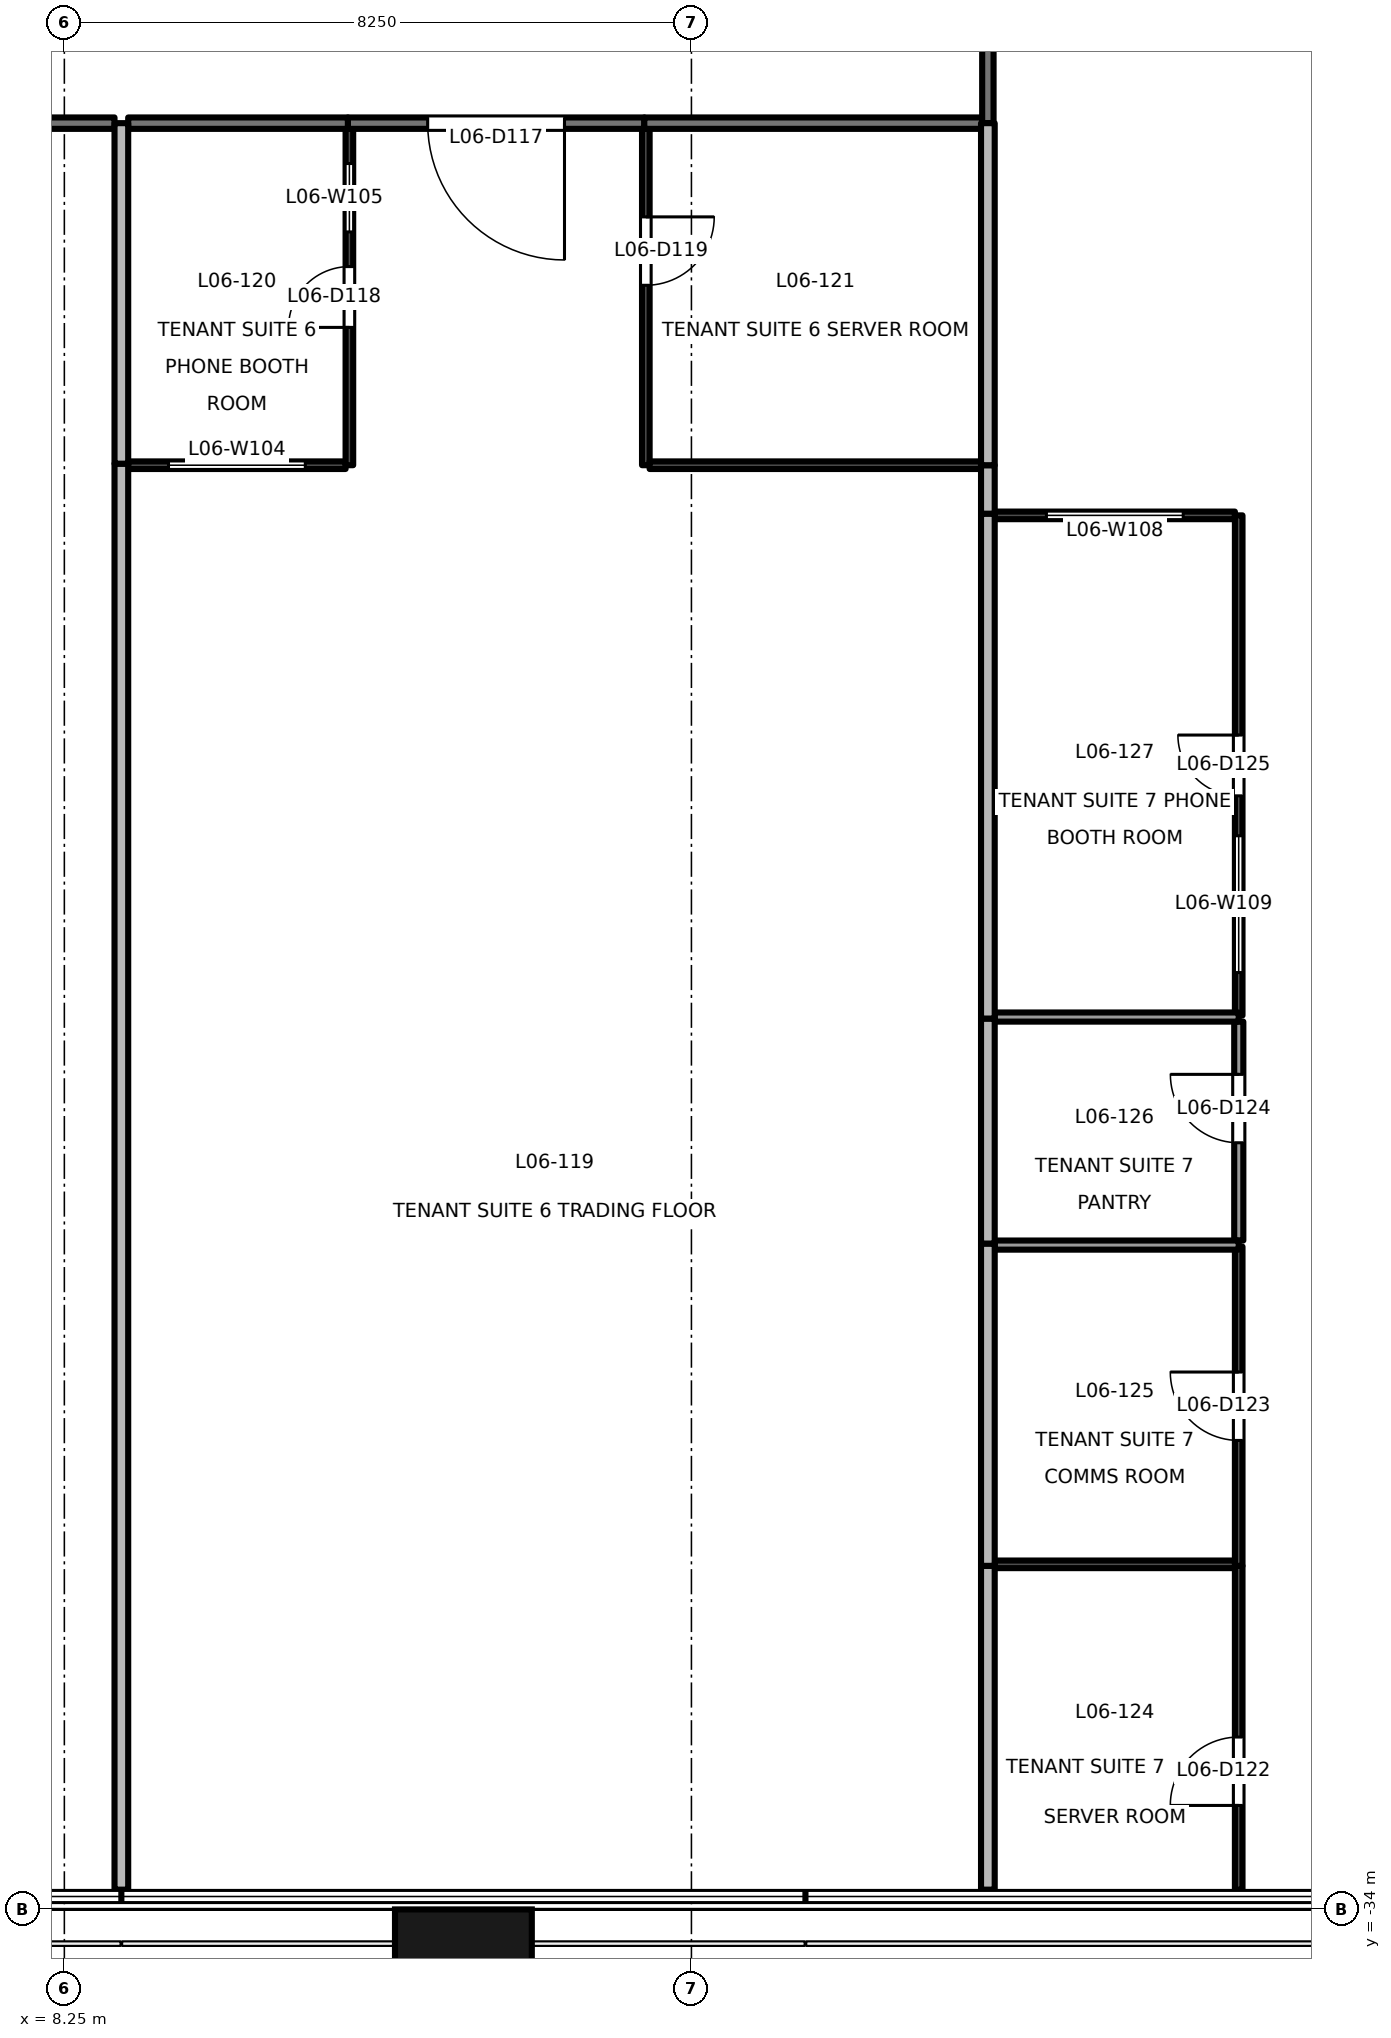
"""IFC4 building model, lengths in metres.
Left out: names, types, materials, properties, quantities, classifications, styles, units other than length and angle.
Written with IfcOpenShell. Run it as: python <this file> out.ifc"""

import sys

from ifc_helpers import new_model, si_unit, direction, frame, frame_2d, origin, origin_2d, place, context, subcontext, project, spatial, rectangle, extrude, element, fill, save


model = new_model("IFC4")
c1 = context("Model", 3, precision=1e-05, world=origin(), true_north=direction((0.0, 1.0)))
c2 = subcontext(c1, "Body", "Model", "MODEL_VIEW")
j1 = project(units=[si_unit("LENGTHUNIT", "METRE"), si_unit("PLANEANGLEUNIT", "RADIAN")], contexts=[c1])
p1 = place(None, origin())
s1 = spatial("IfcSite", under=j1, at=p1, CompositionType="ELEMENT")
p2 = place(p1, origin())
s2 = spatial("IfcBuilding", under=s1, at=p2, CompositionType="ELEMENT")
p3 = place(p2, frame((0.0, 0.0, 32.4)))
s3 = spatial("IfcBuildingStorey", under=s2, at=p3, CompositionType="ELEMENT", Elevation=32.4)
p4 = place(p3, frame((13.5, -34.9, -0.2), z_axis=(0.0, 0.0, 1.0), x_axis=(1.0, 0.0, 0.0)))
e1 = element("IfcColumn", 1, at=p4, inside=s3, PredefinedType="COLUMN", context=c2, shape_type="SweptSolid", body=[
    extrude(rectangle(XDim=1.8, YDim=1.8, at=origin_2d()), origin(), (0.0, 0.0, 1.0), 4.1),
])
p5 = place(p3, frame((8.91, -10.5, 0.0), z_axis=(0.0, 0.0, 1.0), x_axis=(-1.0, 0.0, 0.0)))
e2 = element("IfcWall", 2, at=p5, inside=s3, PredefinedType="PARTITIONING", context=c2, shape_type="SweptSolid", body=[
    extrude(rectangle(XDim=5.93, YDim=0.15, at=frame_2d((2.965, 0.0))), origin(), (0.0, 0.0, 1.0), 2.9),
])
p6 = place(p5, frame((3.197, 0.0, 0.0)))
e3 = element("IfcOpeningElement", 3, at=p6, cuts=e2, PredefinedType="OPENING", context=c2, shape_type="SweptSolid", body=[
    extrude(rectangle(XDim=1.5, YDim=2.1, at=frame_2d((0.75, 1.05))), frame((0.0, 0.085, 0.0), z_axis=(0.0, -1.0, 0.0), x_axis=(1.0, 0.0, 0.0)), (0.0, 0.0, 1.0), 0.171),
])
p7 = place(p3, frame((15.88, -10.5, 0.0), z_axis=(0.0, 0.0, 1.0), x_axis=(-1.0, 0.0, 0.0)))
e4 = element("IfcWall", 4, at=p7, inside=s3, PredefinedType="PARTITIONING", context=c2, shape_type="SweptSolid", body=[
    extrude(rectangle(XDim=3.9, YDim=0.15, at=frame_2d((1.95, 0.0))), origin(), (0.0, 0.0, 1.0), 2.9),
])
p8 = place(p7, frame((1.05, 0.0, 0.0)))
e5 = element("IfcOpeningElement", 5, at=p8, cuts=e4, PredefinedType="OPENING", context=c2, shape_type="SweptSolid", body=[
    extrude(rectangle(XDim=1.8, YDim=2.1, at=frame_2d((0.9, 1.05))), frame((0.0, 0.085, 0.0), z_axis=(0.0, -1.0, 0.0), x_axis=(1.0, 0.0, 0.0)), (0.0, 0.0, 1.0), 0.171),
])
p9 = place(p3, frame((11.98, -10.5, 0.0), z_axis=(0.0, 0.0, 1.0), x_axis=(-1.0, 0.0, 0.0)))
e6 = element("IfcWall", 6, at=p9, inside=s3, PredefinedType="PARTITIONING", context=c2, shape_type="SweptSolid", body=[
    extrude(rectangle(XDim=2.89, YDim=0.15, at=frame_2d((1.445, 0.0))), origin(), (0.0, 0.0, 1.0), 2.9),
])
p10 = place(p3, frame((20.325, -10.5, 0.0), z_axis=(0.0, 0.0, 1.0), x_axis=(-1.0, 0.0, 0.0)))
e7 = element("IfcWall", 7, at=p10, inside=s3, PredefinedType="PARTITIONING", context=c2, shape_type="SweptSolid", body=[
    extrude(rectangle(XDim=4.445, YDim=0.15, at=frame_2d((2.223, 0.0))), origin(), (0.0, 0.0, 1.0), 2.5),
])
p11 = place(p3, frame((20.4, -4.817, 0.0), z_axis=(0.0, 0.0, 1.0), x_axis=(0.0, -1.0, 0.0)))
e8 = element("IfcWall", 8, at=p11, inside=s3, PredefinedType="PARTITIONING", context=c2, shape_type="SweptSolid", body=[
    extrude(rectangle(XDim=5.683, YDim=0.15, at=frame_2d((2.842, 0.0))), origin(), (0.0, 0.0, 1.0), 3.3),
])
p12 = place(p11, frame((1.942, 0.0, 0.0)))
e9 = element("IfcOpeningElement", 9, at=p12, cuts=e8, PredefinedType="OPENING", context=c2, shape_type="SweptSolid", body=[
    extrude(rectangle(XDim=1.8, YDim=2.1, at=frame_2d((0.9, 1.05))), frame((0.0, 0.085, 0.0), z_axis=(0.0, -1.0, 0.0), x_axis=(1.0, 0.0, 0.0)), (0.0, 0.0, 1.0), 0.171),
])
p13 = place(p3, frame((9.0, -14.98, 0.0), z_axis=(0.0, 0.0, 1.0), x_axis=(0.0, -1.0, 0.0)))
e10 = element("IfcWall", 10, at=p13, inside=s3, PredefinedType="PARTITIONING", context=c2, shape_type="SweptSolid", body=[
    extrude(rectangle(XDim=18.76, YDim=0.18, at=frame_2d((9.38, 0.0))), origin(), (0.0, 0.0, 1.0), 2.9),
])
p14 = place(p3, frame((9.0, -10.5, 0.0), z_axis=(0.0, 0.0, 1.0), x_axis=(0.0, -1.0, 0.0)))
e11 = element("IfcWall", 11, at=p14, inside=s3, PredefinedType="PARTITIONING", context=c2, shape_type="SweptSolid", body=[
    extrude(rectangle(XDim=4.48, YDim=0.18, at=frame_2d((2.24, 0.0))), origin(), (0.0, 0.0, 1.0), 2.9),
])
p15 = place(p3, frame((9.09, -15.0, 0.0), z_axis=(0.0, 0.0, 1.0), x_axis=(1.0, 0.0, 0.0)))
e12 = element("IfcWall", 12, at=p15, inside=s3, PredefinedType="PARTITIONING", context=c2, shape_type="SweptSolid", body=[
    extrude(rectangle(XDim=2.86, YDim=0.1, at=frame_2d((1.43, 0.0))), origin(), (0.0, 0.0, 1.0), 2.9),
])
p16 = place(p15, frame((0.53, 0.0, 0.9)))
e13 = element("IfcOpeningElement", 13, at=p16, cuts=e12, PredefinedType="OPENING", context=c2, shape_type="SweptSolid", body=[
    extrude(rectangle(XDim=1.8, YDim=1.2, at=frame_2d((0.9, 0.6))), frame((0.0, 0.061, 0.0), z_axis=(0.0, -1.0, 0.0), x_axis=(1.0, 0.0, 0.0)), (0.0, 0.0, 1.0), 0.121),
])
p17 = place(p3, frame((12.0, -15.0, 0.0), z_axis=(0.0, 0.0, 1.0), x_axis=(0.0, 1.0, 0.0)))
e14 = element("IfcWall", 14, at=p17, inside=s3, PredefinedType="PARTITIONING", context=c2, shape_type="SweptSolid", body=[
    extrude(rectangle(XDim=4.425, YDim=0.1, at=frame_2d((2.212, 0.0))), origin(), (0.0, 0.0, 1.0), 3.9),
])
p18 = place(p17, frame((1.813, 0.0, 0.0)))
e15 = element("IfcOpeningElement", 15, at=p18, cuts=e14, PredefinedType="OPENING", context=c2, shape_type="SweptSolid", body=[
    extrude(rectangle(XDim=0.8, YDim=2.1, at=frame_2d((0.4, 1.05))), frame((0.0, 0.061, 0.0), z_axis=(0.0, -1.0, 0.0), x_axis=(1.0, 0.0, 0.0)), (0.0, 0.0, 1.0), 0.121),
])
p19 = place(p17, frame((3.069, 0.0, 0.9)))
e16 = element("IfcOpeningElement", 16, at=p19, cuts=e14, PredefinedType="OPENING", context=c2, shape_type="SweptSolid", body=[
    extrude(rectangle(XDim=0.9, YDim=1.2, at=frame_2d((0.45, 0.6))), frame((0.0, 0.061, 0.0), z_axis=(0.0, -1.0, 0.0), x_axis=(1.0, 0.0, 0.0)), (0.0, 0.0, 1.0), 0.121),
])
p20 = place(p3, frame((15.9, -10.575, 0.0), z_axis=(0.0, 0.0, 1.0), x_axis=(0.0, -1.0, 0.0)))
e17 = element("IfcWall", 17, at=p20, inside=s3, PredefinedType="PARTITIONING", context=c2, shape_type="SweptSolid", body=[
    extrude(rectangle(XDim=4.425, YDim=0.1, at=frame_2d((2.212, 0.0))), origin(), (0.0, 0.0, 1.0), 3.9),
])
p21 = place(p20, frame((1.158, 0.0, 0.0)))
e18 = element("IfcOpeningElement", 18, at=p21, cuts=e17, PredefinedType="OPENING", context=c2, shape_type="SweptSolid", body=[
    extrude(rectangle(XDim=0.9, YDim=2.1, at=frame_2d((0.45, 1.05))), frame((0.0, 0.061, 0.0), z_axis=(0.0, -1.0, 0.0), x_axis=(1.0, 0.0, 0.0)), (0.0, 0.0, 1.0), 0.121),
])
p22 = place(p3, frame((15.95, -15.0, 0.0), z_axis=(0.0, 0.0, 1.0), x_axis=(1.0, 0.0, 0.0)))
e19 = element("IfcWall", 19, at=p22, inside=s3, PredefinedType="PARTITIONING", context=c2, shape_type="SweptSolid", body=[
    extrude(rectangle(XDim=4.36, YDim=0.1, at=frame_2d((2.18, 0.0))), origin(), (0.0, 0.0, 1.0), 2.5),
])
p23 = place(p3, frame((20.4, -15.0, 0.0), z_axis=(0.0, 0.0, 1.0), x_axis=(0.0, -1.0, 0.0)))
e20 = element("IfcWall", 20, at=p23, inside=s3, PredefinedType="PARTITIONING", context=c2, shape_type="SweptSolid", body=[
    extrude(rectangle(XDim=0.64, YDim=0.18, at=frame_2d((0.32, 0.0))), origin(), (0.0, 0.0, 1.0), 3.9),
])
p24 = place(p3, frame((20.4, -29.48, 0.0), z_axis=(0.0, 0.0, 1.0), x_axis=(0.0, -1.0, 0.0)))
e21 = element("IfcWall", 21, at=p24, inside=s3, PredefinedType="PARTITIONING", context=c2, shape_type="SweptSolid", body=[
    extrude(rectangle(XDim=4.26, YDim=0.18, at=frame_2d((2.13, 0.0))), origin(), (0.0, 0.0, 1.0), 3.9),
])
p25 = place(p3, frame((20.4, -25.24, 0.0), z_axis=(0.0, 0.0, 1.0), x_axis=(0.0, -1.0, 0.0)))
e22 = element("IfcWall", 22, at=p25, inside=s3, PredefinedType="PARTITIONING", context=c2, shape_type="SweptSolid", body=[
    extrude(rectangle(XDim=4.24, YDim=0.18, at=frame_2d((2.12, 0.0))), origin(), (0.0, 0.0, 1.0), 3.3),
])
p26 = place(p3, frame((20.4, -22.28, 0.0), z_axis=(0.0, 0.0, 1.0), x_axis=(0.0, -1.0, 0.0)))
e23 = element("IfcWall", 23, at=p26, inside=s3, PredefinedType="PARTITIONING", context=c2, shape_type="SweptSolid", body=[
    extrude(rectangle(XDim=2.96, YDim=0.18, at=frame_2d((1.48, 0.0))), origin(), (0.0, 0.0, 1.0), 3.3),
])
p27 = place(p3, frame((20.4, -15.64, 0.0), z_axis=(0.0, 0.0, 1.0), x_axis=(0.0, -1.0, 0.0)))
e24 = element("IfcWall", 24, at=p27, inside=s3, PredefinedType="PARTITIONING", context=c2, shape_type="SweptSolid", body=[
    extrude(rectangle(XDim=6.64, YDim=0.18, at=frame_2d((3.32, 0.0))), origin(), (0.0, 0.0, 1.0), 3.3),
])
p28 = place(p3, frame((20.4, -10.5, 0.0), z_axis=(0.0, 0.0, 1.0), x_axis=(0.0, -1.0, 0.0)))
e25 = element("IfcWall", 25, at=p28, inside=s3, PredefinedType="PARTITIONING", context=c2, shape_type="SweptSolid", body=[
    extrude(rectangle(XDim=4.5, YDim=0.18, at=frame_2d((2.25, 0.0))), origin(), (0.0, 0.0, 1.0), 3.3),
])
p29 = place(p3, frame((23.7, -33.74, 0.0), z_axis=(0.0, 0.0, 1.0), x_axis=(0.0, 1.0, 0.0)))
e26 = element("IfcWall", 26, at=p29, inside=s3, PredefinedType="PARTITIONING", context=c2, shape_type="SweptSolid", body=[
    extrude(rectangle(XDim=4.26, YDim=0.1, at=frame_2d((2.13, 0.0))), origin(), (0.0, 0.0, 1.0), 3.9),
])
p30 = place(p29, frame((1.108, 0.0, 0.0)))
e27 = element("IfcOpeningElement", 27, at=p30, cuts=e26, PredefinedType="OPENING", context=c2, shape_type="SweptSolid", body=[
    extrude(rectangle(XDim=0.9, YDim=2.1, at=frame_2d((0.45, 1.05))), frame((0.0, 0.061, 0.0), z_axis=(0.0, -1.0, 0.0), x_axis=(1.0, 0.0, 0.0)), (0.0, 0.0, 1.0), 0.121),
])
p31 = place(p3, frame((23.7, -29.48, 0.0), z_axis=(0.0, 0.0, 1.0), x_axis=(0.0, 1.0, 0.0)))
e28 = element("IfcWall", 28, at=p31, inside=s3, PredefinedType="PARTITIONING", context=c2, shape_type="SweptSolid", body=[
    extrude(rectangle(XDim=4.2, YDim=0.1, at=frame_2d((2.1, 0.0))), origin(), (0.0, 0.0, 1.0), 3.3),
])
p32 = place(p31, frame((1.65, 0.0, 0.0)))
e29 = element("IfcOpeningElement", 29, at=p32, cuts=e28, PredefinedType="OPENING", context=c2, shape_type="SweptSolid", body=[
    extrude(rectangle(XDim=0.9, YDim=2.1, at=frame_2d((0.45, 1.05))), frame((0.0, 0.061, 0.0), z_axis=(0.0, -1.0, 0.0), x_axis=(1.0, 0.0, 0.0)), (0.0, 0.0, 1.0), 0.121),
])
p33 = place(p3, frame((23.701, -25.2, 0.0), z_axis=(0.0, 0.0, 1.0), x_axis=(0.0, 1.0, 0.0)))
e30 = element("IfcWall", 30, at=p33, inside=s3, PredefinedType="PARTITIONING", context=c2, shape_type="SweptSolid", body=[
    extrude(rectangle(XDim=2.88, YDim=0.12, at=frame_2d((1.44, 0.0))), origin(), (0.0, 0.0, 1.0), 3.3),
])
p34 = place(p33, frame((1.286, 0.0, 0.0)))
e31 = element("IfcOpeningElement", 31, at=p34, cuts=e30, PredefinedType="OPENING", context=c2, shape_type="SweptSolid", body=[
    extrude(rectangle(XDim=0.9, YDim=2.1, at=frame_2d((0.45, 1.05))), frame((0.0, 0.071, 0.0), z_axis=(0.0, -1.0, 0.0), x_axis=(1.0, 0.0, 0.0)), (0.0, 0.0, 1.0), 0.141),
])
p35 = place(p3, frame((23.65, -15.66, 0.0), z_axis=(0.0, 0.0, 1.0), x_axis=(-1.0, 0.0, 0.0)))
e32 = element("IfcWall", 32, at=p35, inside=s3, PredefinedType="PARTITIONING", context=c2, shape_type="SweptSolid", body=[
    extrude(rectangle(XDim=3.16, YDim=0.1, at=frame_2d((1.58, 0.0))), origin(), (0.0, 0.0, 1.0), 3.9),
])
p36 = place(p35, frame((0.68, 0.0, 0.9)))
e33 = element("IfcOpeningElement", 33, at=p36, cuts=e32, PredefinedType="OPENING", context=c2, shape_type="SweptSolid", body=[
    extrude(rectangle(XDim=1.8, YDim=1.2, at=frame_2d((0.9, 0.6))), frame((0.0, 0.061, 0.0), z_axis=(0.0, -1.0, 0.0), x_axis=(1.0, 0.0, 0.0)), (0.0, 0.0, 1.0), 0.121),
])
p37 = place(p3, frame((23.7, -22.24, 0.0), z_axis=(0.0, 0.0, 1.0), x_axis=(0.0, 1.0, 0.0)))
e34 = element("IfcWall", 34, at=p37, inside=s3, PredefinedType="PARTITIONING", context=c2, shape_type="SweptSolid", body=[
    extrude(rectangle(XDim=6.58, YDim=0.1, at=frame_2d((3.29, 0.0))), origin(), (0.0, 0.0, 1.0), 3.3),
])
p38 = place(p37, frame((2.89, 0.0, 0.0)))
e35 = element("IfcOpeningElement", 35, at=p38, cuts=e34, PredefinedType="OPENING", context=c2, shape_type="SweptSolid", body=[
    extrude(rectangle(XDim=0.8, YDim=2.1, at=frame_2d((0.4, 1.05))), frame((0.0, 0.061, 0.0), z_axis=(0.0, -1.0, 0.0), x_axis=(1.0, 0.0, 0.0)), (0.0, 0.0, 1.0), 0.121),
])
p39 = place(p37, frame((0.565, 0.0, 0.9)))
e36 = element("IfcOpeningElement", 36, at=p39, cuts=e34, PredefinedType="OPENING", context=c2, shape_type="SweptSolid", body=[
    extrude(rectangle(XDim=1.8, YDim=1.2, at=frame_2d((0.9, 0.6))), frame((0.0, 0.061, 0.0), z_axis=(0.0, -1.0, 0.0), x_axis=(1.0, 0.0, 0.0)), (0.0, 0.0, 1.0), 0.121),
])
p40 = place(p3, frame((20.49, -29.46, 0.0), z_axis=(0.0, 0.0, 1.0), x_axis=(1.0, 0.0, 0.0)))
e37 = element("IfcWall", 37, at=p40, inside=s3, PredefinedType="PARTITIONING", context=c2, shape_type="SweptSolid", body=[
    extrude(rectangle(XDim=3.16, YDim=0.1, at=frame_2d((1.58, 0.0))), origin(), (0.0, 0.0, 1.0), 3.9),
])
for number, where, z_axis, x_axis in (
    (38, (20.49, -25.26, 0.0), (0.0, 0.0, 1.0), (1.0, 0.0, 0.0)),
    (39, (20.49, -22.26, 0.0), (0.0, 0.0, 1.0), (1.0, 0.0, 0.0)),
):
    element("IfcWall", number, at=place(p3, frame(where, z_axis=z_axis, x_axis=x_axis)), inside=s3, PredefinedType="PARTITIONING", context=c2, shape_type="SweptSolid", body=[
        extrude(rectangle(XDim=3.21, YDim=0.12, at=frame_2d((1.605, 0.0))), origin(), (0.0, 0.0, 1.0), 3.9),
    ])
p41 = place(p8, origin())
e40 = element("IfcDoor", 40, at=p41, inside=s3, OperationType="DOUBLE_DOOR_SINGLE_SWING", PredefinedType="DOOR", context=c2, shape_type="SweptSolid", body=[
    extrude(rectangle(XDim=1.8, YDim=2.1, at=frame_2d((0.9, 1.05))), frame((0.0, 0.025, 0.0), z_axis=(0.0, -1.0, 0.0), x_axis=(1.0, 0.0, 0.0)), (0.0, 0.0, 1.0), 0.05),
])
fill(e5, e40)
p42 = place(p18, origin())
e41 = element("IfcDoor", 41, at=p42, inside=s3, OperationType="SINGLE_SWING_LEFT", PredefinedType="DOOR", context=c2, shape_type="SweptSolid", body=[
    extrude(rectangle(XDim=0.8, YDim=2.1, at=frame_2d((0.4, 1.05))), frame((0.0, 0.025, 0.0), z_axis=(0.0, -1.0, 0.0), x_axis=(1.0, 0.0, 0.0)), (0.0, 0.0, 1.0), 0.05),
])
fill(e15, e41)
p43 = place(p21, origin())
e42 = element("IfcDoor", 42, at=p43, inside=s3, OperationType="SINGLE_SWING_LEFT", PredefinedType="DOOR", context=c2, shape_type="SweptSolid", body=[
    extrude(rectangle(XDim=0.9, YDim=2.1, at=frame_2d((0.45, 1.05))), frame((0.0, 0.025, 0.0), z_axis=(0.0, -1.0, 0.0), x_axis=(1.0, 0.0, 0.0)), (0.0, 0.0, 1.0), 0.05),
])
fill(e18, e42)
p44 = place(p30, origin())
e43 = element("IfcDoor", 43, at=p44, inside=s3, OperationType="SINGLE_SWING_LEFT", PredefinedType="DOOR", context=c2, shape_type="SweptSolid", body=[
    extrude(rectangle(XDim=0.9, YDim=2.1, at=frame_2d((0.45, 1.05))), frame((0.0, 0.025, 0.0), z_axis=(0.0, -1.0, 0.0), x_axis=(1.0, 0.0, 0.0)), (0.0, 0.0, 1.0), 0.05),
])
fill(e27, e43)
p45 = place(p32, origin())
e44 = element("IfcDoor", 44, at=p45, inside=s3, OperationType="SINGLE_SWING_RIGHT", PredefinedType="DOOR", context=c2, shape_type="SweptSolid", body=[
    extrude(rectangle(XDim=0.9, YDim=2.1, at=frame_2d((0.45, 1.05))), frame((0.0, 0.025, 0.0), z_axis=(0.0, -1.0, 0.0), x_axis=(1.0, 0.0, 0.0)), (0.0, 0.0, 1.0), 0.05),
])
fill(e29, e44)
p46 = place(p34, origin())
e45 = element("IfcDoor", 45, at=p46, inside=s3, OperationType="SINGLE_SWING_RIGHT", PredefinedType="DOOR", context=c2, shape_type="SweptSolid", body=[
    extrude(rectangle(XDim=0.9, YDim=2.1, at=frame_2d((0.45, 1.05))), frame((0.0, 0.025, 0.0), z_axis=(0.0, -1.0, 0.0), x_axis=(1.0, 0.0, 0.0)), (0.0, 0.0, 1.0), 0.05),
])
fill(e31, e45)
p47 = place(p38, origin())
e46 = element("IfcDoor", 46, at=p47, inside=s3, OperationType="SINGLE_SWING_RIGHT", PredefinedType="DOOR", context=c2, shape_type="SweptSolid", body=[
    extrude(rectangle(XDim=0.8, YDim=2.1, at=frame_2d((0.4, 1.05))), frame((0.0, 0.025, 0.0), z_axis=(0.0, -1.0, 0.0), x_axis=(1.0, 0.0, 0.0)), (0.0, 0.0, 1.0), 0.05),
])
fill(e35, e46)
p48 = place(p16, origin())
e47 = element("IfcWindow", 47, at=p48, inside=s3, PartitioningType="SINGLE_PANEL", PredefinedType="WINDOW", context=c2, shape_type="SweptSolid", body=[
    extrude(rectangle(XDim=1.8, YDim=1.2, at=frame_2d((0.9, 0.6))), frame((0.0, 0.03, 0.0), z_axis=(0.0, -1.0, 0.0), x_axis=(1.0, 0.0, 0.0)), (0.0, 0.0, 1.0), 0.06),
])
fill(e13, e47)
p49 = place(p19, origin())
e48 = element("IfcWindow", 48, at=p49, inside=s3, PartitioningType="SINGLE_PANEL", PredefinedType="WINDOW", context=c2, shape_type="SweptSolid", body=[
    extrude(rectangle(XDim=0.9, YDim=1.2, at=frame_2d((0.45, 0.6))), frame((0.0, 0.03, 0.0), z_axis=(0.0, -1.0, 0.0), x_axis=(1.0, 0.0, 0.0)), (0.0, 0.0, 1.0), 0.06),
])
fill(e16, e48)
p50 = place(p36, origin())
e49 = element("IfcWindow", 49, at=p50, inside=s3, PartitioningType="SINGLE_PANEL", PredefinedType="WINDOW", context=c2, shape_type="SweptSolid", body=[
    extrude(rectangle(XDim=1.8, YDim=1.2, at=frame_2d((0.9, 0.6))), frame((0.0, 0.03, 0.0), z_axis=(0.0, -1.0, 0.0), x_axis=(1.0, 0.0, 0.0)), (0.0, 0.0, 1.0), 0.06),
])
fill(e33, e49)
p51 = place(p39, origin())
e50 = element("IfcWindow", 50, at=p51, inside=s3, PartitioningType="SINGLE_PANEL", PredefinedType="WINDOW", context=c2, shape_type="SweptSolid", body=[
    extrude(rectangle(XDim=1.8, YDim=1.2, at=frame_2d((0.9, 0.6))), frame((0.0, 0.03, 0.0), z_axis=(0.0, -1.0, 0.0), x_axis=(1.0, 0.0, 0.0)), (0.0, 0.0, 1.0), 0.06),
])
fill(e36, e50)
save(model, sys.argv[1])
